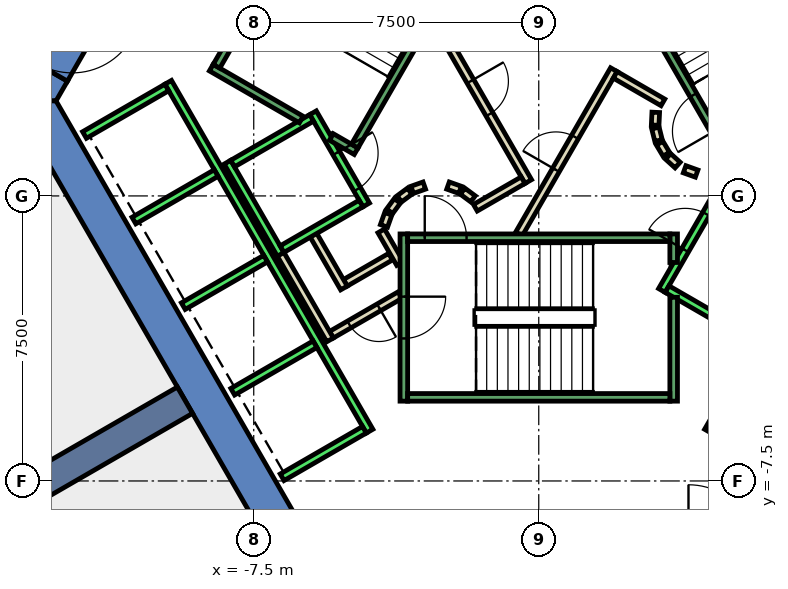
"""IFC4 building model, lengths in metres.
Left out: names, types, materials, properties, quantities, classifications, styles, units other than length and angle.
Written with IfcOpenShell. Run it as: python <this file> out.ifc"""

import sys

from ifc_helpers import new_model, si_unit, direction, frame, frame_2d, origin, place, context, subcontext, project, spatial, polyline, rectangle, outline, extrude, element, fill, save


model = new_model("IFC4")
c1 = context("Model", 3, precision=1e-05, world=origin(), true_north=direction((0.0, 1.0)))
c2 = subcontext(c1, "Body", "Model", "MODEL_VIEW")
j1 = project(units=[si_unit("LENGTHUNIT", "METRE"), si_unit("PLANEANGLEUNIT", "RADIAN")], contexts=[c1])
p1 = place(None, origin())
s1 = spatial("IfcSite", under=j1, at=p1, CompositionType="ELEMENT")
p2 = place(p1, origin())
s2 = spatial("IfcBuilding", under=s1, at=p2, CompositionType="ELEMENT")
p3 = place(p2, frame((0.0, 0.0, 47.6)))
s3 = spatial("IfcBuildingStorey", under=s2, at=p3, CompositionType="ELEMENT", Elevation=47.6)
p4 = place(p3, frame((0.0, 0.0, -0.4)))
e1 = element("IfcWall", 1, at=p4, inside=s3, PredefinedType="SHEAR", context=c2, shape_type="SweptSolid", body=[
    extrude(outline(polyline([(-12.402, 3.02), (-13.267, 3.52), (-13.856, 2.5), (-12.702, 2.5), (-12.402, 3.02)])), origin(), (0.0, 0.0, 1.0), 4.2),
])
p5 = place(p3, frame((0.0, 0.0, 3.6)))
e2 = element("IfcWall", 2, at=p5, inside=s3, PredefinedType="SHEAR", context=c2, shape_type="SweptSolid", body=[
    extrude(outline(polyline([(-13.267, 3.52), (-12.402, 3.02), (-11.402, 4.752), (-12.267, 5.252), (-13.267, 3.52)])), origin(), (0.0, 0.0, 1.0), 0.2),
])
p6 = place(p3, frame((0.0, 0.0, -0.4)))
e3 = element("IfcWall", 3, at=p6, inside=s3, PredefinedType="SHEAR", context=c2, shape_type="SweptSolid", body=[
    extrude(outline(polyline([(-13.856, 2.5), (-6.928, -9.5), (-6.351, -8.5), (-12.702, 2.5), (-13.856, 2.5)])), origin(), (0.0, 0.0, 1.0), 4.2),
])
p7 = place(p3, frame((-9.31, -5.375, -0.4), z_axis=(0.0, 0.0, 1.0), x_axis=(-0.866017533419, -0.500013631625, 0.0)))
e4 = element("IfcWall", 4, at=p7, inside=s3, PredefinedType="SHEAR", context=c2, shape_type="SweptSolid", body=[
    extrude(rectangle(XDim=9.0, YDim=0.8, at=frame_2d((4.5, 0.0))), origin(), (0.0, 0.0, 1.0), 4.2),
])
p8 = place(p3, frame((-3.9, -1.599, 0.0), z_axis=(0.0, 0.0, 1.0), x_axis=(-0.865969445389, -0.500096910261, 0.0)))
e5 = element("IfcWall", 5, at=p8, inside=s3, PredefinedType="PARTITIONING", context=c2, shape_type="SweptSolid", body=[
    extrude(rectangle(XDim=1.373, YDim=0.2, at=frame_2d((0.687, 0.0))), origin(), (0.0, 0.0, 1.0), 3.8),
])
p9 = place(p3, frame((-5.126, -2.422, 0.0), z_axis=(0.0, 0.0, 1.0), x_axis=(-0.500062241894, 0.865989465428, 0.0)))
e6 = element("IfcWall", 6, at=p9, inside=s3, PredefinedType="PARTITIONING", context=c2, shape_type="SweptSolid", body=[
    extrude(rectangle(XDim=1.7, YDim=0.2, at=frame_2d((0.85, 0.0))), origin(), (0.0, 0.0, 1.0), 3.8),
])
p10 = place(p3, frame((-3.65, -2.61, 0.0), z_axis=(0.0, 0.0, 1.0), x_axis=(-0.866072462134, -0.499918483688, 0.0)))
e7 = element("IfcWall", 7, at=p10, inside=s3, PredefinedType="PARTITIONING", context=c2, shape_type="SweptSolid", body=[
    extrude(rectangle(XDim=2.084, YDim=0.2, at=frame_2d((1.042, 0.0))), origin(), (0.0, 0.0, 1.0), 3.8),
])
p11 = place(p10, frame((0.642, 0.0, 0.0)))
e8 = element("IfcOpeningElement", 8, at=p11, cuts=e7, PredefinedType="OPENING", context=c2, shape_type="SweptSolid", body=[
    extrude(rectangle(XDim=0.9, YDim=2.1, at=frame_2d((0.45, 1.05))), frame((0.0, 0.11, 0.0), z_axis=(0.0, -1.0, 0.0), x_axis=(1.0, 0.0, 0.0)), (0.0, 0.0, 1.0), 0.22),
])
p12 = place(p3, frame((-5.492, -3.788, 0.0), z_axis=(0.0, 0.0, 1.0), x_axis=(-0.500008949224, 0.866020236886, 0.0)))
e9 = element("IfcWall", 9, at=p12, inside=s3, PredefinedType="PARTITIONING", context=c2, shape_type="SweptSolid", body=[
    extrude(rectangle(XDim=2.68, YDim=0.2, at=frame_2d((1.34, 0.0))), origin(), (0.0, 0.0, 1.0), 3.8),
])
p13 = place(p3, frame((-4.145, -0.92, 0.0), z_axis=(0.0, 0.0, 1.0), x_axis=(0.499743786207, -0.866173278362, 0.0)))
e10 = element("IfcWall", 10, at=p13, inside=s3, PredefinedType="PARTITIONING", context=c2, shape_type="SweptSolid", body=[
    extrude(rectangle(XDim=0.991, YDim=0.2, at=frame_2d((0.495, 0.0))), origin(), (0.0, 0.0, 1.0), 3.8),
])
p14 = place(p3, frame((-0.52, -1.0, 0.0), z_axis=(0.0, 0.0, 1.0), x_axis=(0.50011622646, 0.865958290007, 0.0)))
e11 = element("IfcWall", 11, at=p14, inside=s3, PredefinedType="PARTITIONING", context=c2, shape_type="SweptSolid", body=[
    extrude(rectangle(XDim=4.991, YDim=0.2, at=frame_2d((2.496, 0.0))), origin(), (0.0, 0.0, 1.0), 3.8),
])
p15 = place(p14, frame((1.945, 0.0, 0.0)))
e12 = element("IfcOpeningElement", 12, at=p15, cuts=e11, PredefinedType="OPENING", context=c2, shape_type="SweptSolid", body=[
    extrude(rectangle(XDim=1.0, YDim=2.1, at=frame_2d((0.5, 1.05))), frame((0.0, 0.11, 0.0), z_axis=(0.0, -1.0, 0.0), x_axis=(1.0, 0.0, 0.0)), (0.0, 0.0, 1.0), 0.22),
])
p16 = place(p3, frame((2.012, 3.186, 0.0), z_axis=(0.0, 0.0, 1.0), x_axis=(0.865891012941, -0.500232699559, 0.0)))
e13 = element("IfcWall", 13, at=p16, inside=s3, PredefinedType="PARTITIONING", context=c2, shape_type="SweptSolid", body=[
    extrude(rectangle(XDim=1.449, YDim=0.2, at=frame_2d((0.725, 0.0))), origin(), (0.0, 0.0, 1.0), 3.8),
])
p17 = place(p3, frame((3.079, 2.199, 0.0), z_axis=(0.0, 0.0, 1.0), x_axis=(-0.047771483479, -0.998858290933, 0.0)))
e14 = element("IfcWall", 14, at=p17, inside=s3, PredefinedType="PARTITIONING", context=c2, shape_type="SweptSolid", body=[
    extrude(rectangle(XDim=0.337, YDim=0.2, at=frame_2d((0.169, 0.0))), origin(), (0.0, 0.0, 1.0), 3.8),
])
p18 = place(p3, frame((3.07, 1.786, 0.0), z_axis=(0.0, 0.0, 1.0), x_axis=(0.242705583207, -0.970099994784, 0.0)))
e15 = element("IfcWall", 15, at=p18, inside=s3, PredefinedType="PARTITIONING", context=c2, shape_type="SweptSolid", body=[
    extrude(rectangle(XDim=0.338, YDim=0.2, at=frame_2d((0.169, 0.0))), origin(), (0.0, 0.0, 1.0), 3.8),
])
for number, where, z_axis, x_axis in (
    (16, (3.182, 1.388, 0.0), (0.0, 0.0, 1.0), (0.512, -0.859, 0.0)),
    (17, (3.404, 1.039, 0.0), (0.0, 0.0, 1.0), (0.74, -0.672, 0.0)),
):
    element("IfcWall", number, at=place(p3, frame(where, z_axis=z_axis, x_axis=x_axis)), inside=s3, PredefinedType="PARTITIONING", context=c2, shape_type="SweptSolid", body=[
        extrude(rectangle(XDim=0.338, YDim=0.2, at=frame_2d((0.169, 0.0))), origin(), (0.0, 0.0, 1.0), 3.8),
    ])
p19 = place(p3, frame((3.838, 0.702, 0.0), z_axis=(0.0, 0.0, 1.0), x_axis=(0.941035081519, -0.338308993895, 0.0)))
e18 = element("IfcWall", 18, at=p19, inside=s3, PredefinedType="PARTITIONING", context=c2, shape_type="SweptSolid", body=[
    extrude(rectangle(XDim=0.337, YDim=0.2, at=frame_2d((0.168, 0.0))), origin(), (0.0, 0.0, 1.0), 3.8),
])
p20 = place(p3, frame((-2.771, 4.7, 0.0), z_axis=(0.0, 0.0, 1.0), x_axis=(0.499969479948, -0.866043023828, 0.0)))
e19 = element("IfcWall", 19, at=p20, inside=s3, PredefinedType="PARTITIONING", context=c2, shape_type="SweptSolid", body=[
    extrude(rectangle(XDim=4.99, YDim=0.2, at=frame_2d((2.495, 0.0))), origin(), (0.0, 0.0, 1.0), 3.8),
])
p21 = place(p20, frame((1.945, 0.0, 0.0)))
e20 = element("IfcOpeningElement", 20, at=p21, cuts=e19, PredefinedType="OPENING", context=c2, shape_type="SweptSolid", body=[
    extrude(rectangle(XDim=1.0, YDim=2.1, at=frame_2d((0.5, 1.05))), frame((0.0, 0.11, 0.0), z_axis=(0.0, -1.0, 0.0), x_axis=(1.0, 0.0, 0.0)), (0.0, 0.0, 1.0), 0.22),
])
p22 = place(p3, frame((-0.412, 0.414, 0.0), z_axis=(0.0, 0.0, 1.0), x_axis=(-0.866017369001, -0.500013916395, 0.0)))
e21 = element("IfcWall", 21, at=p22, inside=s3, PredefinedType="PARTITIONING", context=c2, shape_type="SweptSolid", body=[
    extrude(rectangle(XDim=1.45, YDim=0.2, at=frame_2d((0.725, 0.0))), origin(), (0.0, 0.0, 1.0), 3.8),
])
p23 = place(p3, frame((-1.731, -0.077, 0.0), z_axis=(0.0, 0.0, 1.0), x_axis=(-0.804311165252, 0.594208338422, 0.0)))
e22 = element("IfcWall", 22, at=p23, inside=s3, PredefinedType="PARTITIONING", context=c2, shape_type="SweptSolid", body=[
    extrude(rectangle(XDim=0.338, YDim=0.2, at=frame_2d((0.169, 0.0))), origin(), (0.0, 0.0, 1.0), 3.8),
])
p24 = place(p3, frame((-2.07, 0.16, 0.0), z_axis=(0.0, 0.0, 1.0), x_axis=(-0.942199461132, 0.335052496547, 0.0)))
e23 = element("IfcWall", 23, at=p24, inside=s3, PredefinedType="PARTITIONING", context=c2, shape_type="SweptSolid", body=[
    extrude(rectangle(XDim=0.337, YDim=0.2, at=frame_2d((0.169, 0.0))), origin(), (0.0, 0.0, 1.0), 3.8),
])
p25 = place(p3, frame((-3.012, 0.273, 0.0), z_axis=(0.0, 0.0, 1.0), x_axis=(-0.942280615813, -0.334824194261, 0.0)))
e24 = element("IfcWall", 24, at=p25, inside=s3, PredefinedType="PARTITIONING", context=c2, shape_type="SweptSolid", body=[
    extrude(rectangle(XDim=0.338, YDim=0.2, at=frame_2d((0.169, 0.0))), origin(), (0.0, 0.0, 1.0), 3.8),
])
p26 = place(p3, frame((-3.397, 0.124, 0.0), z_axis=(0.0, 0.0, 1.0), x_axis=(-0.804311165252, -0.594208338422, 0.0)))
e25 = element("IfcWall", 25, at=p26, inside=s3, PredefinedType="PARTITIONING", context=c2, shape_type="SweptSolid", body=[
    extrude(rectangle(XDim=0.338, YDim=0.2, at=frame_2d((0.169, 0.0))), origin(), (0.0, 0.0, 1.0), 3.8),
])
p27 = place(p3, frame((-3.723, -0.131, 0.0), z_axis=(0.0, 0.0, 1.0), x_axis=(-0.594675113454, -0.803966112121, 0.0)))
e26 = element("IfcWall", 26, at=p27, inside=s3, PredefinedType="PARTITIONING", context=c2, shape_type="SweptSolid", body=[
    extrude(rectangle(XDim=0.338, YDim=0.2, at=frame_2d((0.169, 0.0))), origin(), (0.0, 0.0, 1.0), 3.8),
])
p28 = place(p3, frame((-3.96, -0.47, 0.0), z_axis=(0.0, 0.0, 1.0), x_axis=(-0.334824194261, -0.942280615813, 0.0)))
e27 = element("IfcWall", 27, at=p28, inside=s3, PredefinedType="PARTITIONING", context=c2, shape_type="SweptSolid", body=[
    extrude(rectangle(XDim=0.338, YDim=0.2, at=frame_2d((0.169, 0.0))), origin(), (0.0, 0.0, 1.0), 3.8),
])
p29 = place(p3, frame((-12.18, 5.202, 0.0), z_axis=(0.0, 0.0, 1.0), x_axis=(-0.50002537861, -0.866010750942, 0.0)))
e28 = element("IfcWall", 28, at=p29, inside=s3, PredefinedType="PARTITIONING", context=c2, shape_type="SweptSolid", body=[
    extrude(rectangle(XDim=2.0, YDim=0.2, at=frame_2d((1.0, 0.0))), origin(), (0.0, 0.0, 1.0), 2.4),
])
p30 = place(p29, frame((0.19, 0.0, 0.0)))
e29 = element("IfcOpeningElement", 29, at=p30, cuts=e28, PredefinedType="OPENING", context=c2, shape_type="SweptSolid", body=[
    extrude(rectangle(XDim=1.8, YDim=2.1, at=frame_2d((0.9, 1.05))), frame((0.0, 0.11, 0.0), z_axis=(0.0, -1.0, 0.0), x_axis=(1.0, 0.0, 0.0)), (0.0, 0.0, 1.0), 0.22),
])
p31 = place(p3, frame((-5.94, 2.188, 0.0), z_axis=(0.0, 0.0, 1.0), x_axis=(0.49994636267, -0.866056369097, 0.0)))
e30 = element("IfcWall", 30, at=p31, inside=s3, PredefinedType="STANDARD", context=c2, shape_type="SweptSolid", body=[
    extrude(rectangle(XDim=2.8, YDim=0.2, at=frame_2d((1.4, 0.0))), origin(), (0.0, 0.0, 1.0), 3.8),
])
p32 = place(p31, frame((1.225, 0.0, 0.0)))
e31 = element("IfcOpeningElement", 31, at=p32, cuts=e30, PredefinedType="OPENING", context=c2, shape_type="SweptSolid", body=[
    extrude(rectangle(XDim=1.1, YDim=2.1, at=frame_2d((0.55, 1.05))), frame((0.0, 0.11, 0.0), z_axis=(0.0, -1.0, 0.0), x_axis=(1.0, 0.0, 0.0)), (0.0, 0.0, 1.0), 0.22),
])
p33 = place(p3, frame((-8.192, 0.888, 0.0), z_axis=(0.0, 0.0, 1.0), x_axis=(0.49994636267, -0.866056369097, 0.0)))
e32 = element("IfcWall", 32, at=p33, inside=s3, PredefinedType="STANDARD", context=c2, shape_type="SweptSolid", body=[
    extrude(rectangle(XDim=2.8, YDim=0.2, at=frame_2d((1.4, 0.0))), origin(), (0.0, 0.0, 1.0), 3.8),
])
for number, where, z_axis, x_axis in (
    (33, (-5.977, 2.052, 0.0), (0.0, 0.0, 1.0), (-0.866, -0.5, 0.0)),
    (34, (-4.677, -0.2, 0.0), (0.0, 0.0, 1.0), (-0.866, -0.5, 0.0)),
):
    element("IfcWall", number, at=place(p3, frame(where, z_axis=z_axis, x_axis=x_axis)), inside=s3, PredefinedType="STANDARD", context=c2, shape_type="SweptSolid", body=[
        extrude(rectangle(XDim=2.399, YDim=0.2, at=frame_2d((1.2, 0.0))), origin(), (0.0, 0.0, 1.0), 3.8),
    ])
p34 = place(p3, frame((-9.751, 2.99, 0.0), z_axis=(0.0, 0.0, 1.0), x_axis=(0.50000090737, -0.866024879913, 0.0)))
e35 = element("IfcWall", 35, at=p34, inside=s3, PredefinedType="STANDARD", context=c2, shape_type="SweptSolid", body=[
    extrude(rectangle(XDim=10.6, YDim=0.2, at=frame_2d((5.3, 0.0))), origin(), (0.0, 0.0, 1.0), 3.8),
])
p35 = place(p3, frame((-9.788, 2.853, 0.0), z_axis=(0.0, 0.0, 1.0), x_axis=(-0.865998541277, -0.500046524342, 0.0)))
e36 = element("IfcWall", 36, at=p35, inside=s3, PredefinedType="STANDARD", context=c2, shape_type="SweptSolid", body=[
    extrude(rectangle(XDim=2.5, YDim=0.2, at=frame_2d((1.25, 0.0))), origin(), (0.0, 0.0, 1.0), 3.8),
])
for number, where, z_axis, x_axis in (
    (37, (-8.488, 0.602, 0.0), (0.0, 0.0, 1.0), (-0.866, -0.5, 0.0)),
    (38, (-7.188, -1.65, 0.0), (0.0, 0.0, 1.0), (-0.866, -0.5, 0.0)),
    (39, (-5.888, -3.902, 0.0), (0.0, 0.0, 1.0), (-0.866, -0.5, 0.0)),
    (40, (-4.588, -6.153, 0.0), (0.0, 0.0, 1.0), (-0.866, -0.5, 0.0)),
):
    element("IfcWall", number, at=place(p3, frame(where, z_axis=z_axis, x_axis=x_axis)), inside=s3, PredefinedType="STANDARD", context=c2, shape_type="SweptSolid", body=[
        extrude(rectangle(XDim=2.5, YDim=0.2, at=frame_2d((1.25, 0.0))), origin(), (0.0, 0.0, 1.0), 3.8),
    ])
p36 = place(p3, frame((3.24, -2.488, 0.0), z_axis=(0.0, 0.0, 1.0), x_axis=(0.49994636267, 0.866056369097, 0.0)))
e41 = element("IfcWall", 41, at=p36, inside=s3, PredefinedType="STANDARD", context=c2, shape_type="SweptSolid", body=[
    extrude(rectangle(XDim=2.8, YDim=0.2, at=frame_2d((1.4, 0.0))), origin(), (0.0, 0.0, 1.0), 3.8),
])
p37 = place(p36, frame((1.225, 0.0, 0.0)))
e42 = element("IfcOpeningElement", 42, at=p37, cuts=e41, PredefinedType="OPENING", context=c2, shape_type="SweptSolid", body=[
    extrude(rectangle(XDim=1.1, YDim=2.1, at=frame_2d((0.55, 1.05))), frame((0.0, 0.11, 0.0), z_axis=(0.0, -1.0, 0.0), x_axis=(1.0, 0.0, 0.0)), (0.0, 0.0, 1.0), 0.22),
])
p38 = place(p3, frame((3.377, -2.452, 0.0), z_axis=(0.0, 0.0, 1.0), x_axis=(0.865955154139, -0.50012165622, 0.0)))
e43 = element("IfcWall", 43, at=p38, inside=s3, PredefinedType="STANDARD", context=c2, shape_type="SweptSolid", body=[
    extrude(rectangle(XDim=2.4, YDim=0.2, at=frame_2d((1.2, 0.0))), origin(), (0.0, 0.0, 1.0), 3.8),
])
p39 = place(p3, frame((4.451, -6.19, 0.0), z_axis=(0.0, 0.0, 1.0), x_axis=(0.50000090737, 0.866024879913, 0.0)))
e44 = element("IfcWall", 44, at=p39, inside=s3, PredefinedType="STANDARD", context=c2, shape_type="SweptSolid", body=[
    extrude(rectangle(XDim=10.6, YDim=0.2, at=frame_2d((5.3, 0.0))), origin(), (0.0, 0.0, 1.0), 3.8),
])
p40 = place(p3, frame((-3.55, -1.0, 0.0), z_axis=(0.0, 0.0, 1.0), x_axis=(0.0, -1.0, 0.0)))
e45 = element("IfcWall", 45, at=p40, inside=s3, PredefinedType="STANDARD", context=c2, shape_type="SweptSolid", body=[
    extrude(rectangle(XDim=4.4, YDim=0.2, at=frame_2d((2.2, 0.0))), origin(), (0.0, 0.0, 1.0), 3.8),
])
p41 = place(p40, frame((1.65, 0.0, 0.0)))
e46 = element("IfcOpeningElement", 46, at=p41, cuts=e45, PredefinedType="OPENING", context=c2, shape_type="SweptSolid", body=[
    extrude(rectangle(XDim=1.1, YDim=2.2, at=frame_2d((0.55, 1.1))), frame((0.0, 0.11, 0.0), z_axis=(0.0, -1.0, 0.0), x_axis=(1.0, 0.0, 0.0)), (0.0, 0.0, 1.0), 0.22),
])
p42 = place(p3, frame((3.55, -2.667, 0.0), z_axis=(0.0, 0.0, 1.0), x_axis=(0.0, -1.0, 0.0)))
e47 = element("IfcWall", 47, at=p42, inside=s3, PredefinedType="STANDARD", context=c2, shape_type="SweptSolid", body=[
    extrude(rectangle(XDim=2.733, YDim=0.2, at=frame_2d((1.366, 0.0))), origin(), (0.0, 0.0, 1.0), 3.8),
])
p43 = place(p3, frame((3.55, -1.0, 0.0), z_axis=(0.0, 0.0, 1.0), x_axis=(0.0, -1.0, 0.0)))
e48 = element("IfcWall", 48, at=p43, inside=s3, PredefinedType="STANDARD", context=c2, shape_type="SweptSolid", body=[
    extrude(rectangle(XDim=0.751, YDim=0.2, at=frame_2d((0.375, 0.0))), origin(), (0.0, 0.0, 1.0), 3.8),
])
p44 = place(p3, frame((-3.45, -1.1, 0.0), z_axis=(0.0, 0.0, 1.0), x_axis=(1.0, 0.0, 0.0)))
e49 = element("IfcWall", 49, at=p44, inside=s3, PredefinedType="STANDARD", context=c2, shape_type="SweptSolid", body=[
    extrude(rectangle(XDim=6.9, YDim=0.2, at=frame_2d((3.45, 0.0))), origin(), (0.0, 0.0, 1.0), 3.8),
])
p45 = place(p44, frame((0.45, 0.0, 0.0)))
e50 = element("IfcOpeningElement", 50, at=p45, cuts=e49, PredefinedType="OPENING", context=c2, shape_type="SweptSolid", body=[
    extrude(rectangle(XDim=1.1, YDim=2.2, at=frame_2d((0.55, 1.1))), frame((0.0, 0.11, 0.0), z_axis=(0.0, -1.0, 0.0), x_axis=(1.0, 0.0, 0.0)), (0.0, 0.0, 1.0), 0.22),
])
p46 = place(p3, frame((-3.45, -5.3, 0.0), z_axis=(0.0, 0.0, 1.0), x_axis=(1.0, 0.0, 0.0)))
e51 = element("IfcWall", 51, at=p46, inside=s3, PredefinedType="STANDARD", context=c2, shape_type="SweptSolid", body=[
    extrude(rectangle(XDim=6.9, YDim=0.2, at=frame_2d((3.45, 0.0))), origin(), (0.0, 0.0, 1.0), 3.8),
])
p47 = place(p3, frame((4.843, 1.312, 0.0), z_axis=(0.0, 0.0, 1.0), x_axis=(-0.499963383562, 0.866046543262, 0.0)))
e52 = element("IfcWall", 52, at=p47, inside=s3, PredefinedType="STANDARD", context=c2, shape_type="SweptSolid", body=[
    extrude(rectangle(XDim=6.9, YDim=0.2, at=frame_2d((3.45, 0.0))), origin(), (0.0, 0.0, 1.0), 3.8),
])
p48 = place(p47, frame((0.45, 0.0, 0.0)))
e53 = element("IfcOpeningElement", 53, at=p48, cuts=e52, PredefinedType="OPENING", context=c2, shape_type="SweptSolid", body=[
    extrude(rectangle(XDim=1.1, YDim=2.2, at=frame_2d((0.55, 1.1))), frame((0.0, 0.11, 0.0), z_axis=(0.0, -1.0, 0.0), x_axis=(1.0, 0.0, 0.0)), (0.0, 0.0, 1.0), 0.22),
])
p49 = place(p3, frame((-6.25, 2.01, 0.0), z_axis=(0.0, 0.0, 1.0), x_axis=(-0.86611865017, 0.499838457731, 0.0)))
e54 = element("IfcWall", 54, at=p49, inside=s3, PredefinedType="STANDARD", context=c2, shape_type="SweptSolid", body=[
    extrude(rectangle(XDim=2.733, YDim=0.2, at=frame_2d((1.366, 0.0))), origin(), (0.0, 0.0, 1.0), 3.8),
])
p50 = place(p3, frame((-4.806, 1.176, 0.0), z_axis=(0.0, 0.0, 1.0), x_axis=(-0.866558586415, 0.499075361355, 0.0)))
e55 = element("IfcWall", 55, at=p50, inside=s3, PredefinedType="STANDARD", context=c2, shape_type="SweptSolid", body=[
    extrude(rectangle(XDim=0.751, YDim=0.2, at=frame_2d((0.376, 0.0))), origin(), (0.0, 0.0, 1.0), 3.8),
])
p51 = place(p3, frame((-1.393, 7.288, 0.0), z_axis=(0.0, 0.0, 1.0), x_axis=(-0.499963383562, -0.866046543262, 0.0)))
e56 = element("IfcWall", 56, at=p51, inside=s3, PredefinedType="STANDARD", context=c2, shape_type="SweptSolid", body=[
    extrude(rectangle(XDim=6.9, YDim=0.2, at=frame_2d((3.45, 0.0))), origin(), (0.0, 0.0, 1.0), 3.8),
])
p52 = place(p51, frame((0.45, 0.0, 0.0)))
e57 = element("IfcOpeningElement", 57, at=p52, cuts=e56, PredefinedType="OPENING", context=c2, shape_type="SweptSolid", body=[
    extrude(rectangle(XDim=1.1, YDim=2.2, at=frame_2d((0.55, 1.1))), frame((0.0, 0.11, 0.0), z_axis=(0.0, -1.0, 0.0), x_axis=(1.0, 0.0, 0.0)), (0.0, 0.0, 1.0), 0.22),
])
p53 = place(p3, frame((-5.03, 9.388, 0.0), z_axis=(0.0, 0.0, 1.0), x_axis=(-0.499978703459, -0.866037698999, 0.0)))
e58 = element("IfcWall", 58, at=p53, inside=s3, PredefinedType="STANDARD", context=c2, shape_type="SweptSolid", body=[
    extrude(rectangle(XDim=6.9, YDim=0.2, at=frame_2d((3.45, 0.0))), origin(), (0.0, 0.0, 1.0), 3.8),
])
p54 = place(p15, origin())
e59 = element("IfcDoor", 59, at=p54, inside=s3, OperationType="SINGLE_SWING_LEFT", PredefinedType="DOOR", context=c2, shape_type="SweptSolid", body=[
    extrude(rectangle(XDim=1.0, YDim=2.1, at=frame_2d((0.5, 1.05))), frame((0.0, 0.025, 0.0), z_axis=(0.0, -1.0, 0.0), x_axis=(1.0, 0.0, 0.0)), (0.0, 0.0, 1.0), 0.05),
])
fill(e12, e59)
p55 = place(p21, origin())
e60 = element("IfcDoor", 60, at=p55, inside=s3, OperationType="SINGLE_SWING_RIGHT", PredefinedType="DOOR", context=c2, shape_type="SweptSolid", body=[
    extrude(rectangle(XDim=1.0, YDim=2.1, at=frame_2d((0.5, 1.05))), frame((0.0, 0.025, 0.0), z_axis=(0.0, -1.0, 0.0), x_axis=(1.0, 0.0, 0.0)), (0.0, 0.0, 1.0), 0.05),
])
fill(e20, e60)
p56 = place(p11, origin())
e61 = element("IfcDoor", 61, at=p56, inside=s3, OperationType="SINGLE_SWING_LEFT", PredefinedType="DOOR", context=c2, shape_type="SweptSolid", body=[
    extrude(rectangle(XDim=0.9, YDim=2.1, at=frame_2d((0.45, 1.05))), frame((0.0, 0.025, 0.0), z_axis=(0.0, -1.0, 0.0), x_axis=(1.0, 0.0, 0.0)), (0.0, 0.0, 1.0), 0.05),
])
fill(e8, e61)
p57 = place(p30, origin())
e62 = element("IfcDoor", 62, at=p57, inside=s3, OperationType="DOUBLE_DOOR_SINGLE_SWING", PredefinedType="DOOR", context=c2, shape_type="SweptSolid", body=[
    extrude(rectangle(XDim=1.8, YDim=2.1, at=frame_2d((0.9, 1.05))), frame((0.0, 0.025, 0.0), z_axis=(0.0, -1.0, 0.0), x_axis=(1.0, 0.0, 0.0)), (0.0, 0.0, 1.0), 0.05),
])
fill(e29, e62)
p58 = place(p37, origin())
e63 = element("IfcDoor", 63, at=p58, inside=s3, OperationType="SLIDING_TO_LEFT", PredefinedType="DOOR", context=c2, shape_type="SweptSolid", body=[
    extrude(rectangle(XDim=1.1, YDim=2.1, at=frame_2d((0.55, 1.05))), frame((0.0, 0.025, 0.0), z_axis=(0.0, -1.0, 0.0), x_axis=(1.0, 0.0, 0.0)), (0.0, 0.0, 1.0), 0.05),
])
fill(e42, e63)
p59 = place(p32, origin())
e64 = element("IfcDoor", 64, at=p59, inside=s3, OperationType="SLIDING_TO_LEFT", PredefinedType="DOOR", context=c2, shape_type="SweptSolid", body=[
    extrude(rectangle(XDim=1.1, YDim=2.1, at=frame_2d((0.55, 1.05))), frame((0.0, 0.025, 0.0), z_axis=(0.0, -1.0, 0.0), x_axis=(1.0, 0.0, 0.0)), (0.0, 0.0, 1.0), 0.05),
])
fill(e31, e64)
p60 = place(p45, origin())
e65 = element("IfcDoor", 65, at=p60, inside=s3, OperationType="SINGLE_SWING_LEFT", PredefinedType="DOOR", context=c2, shape_type="SweptSolid", body=[
    extrude(rectangle(XDim=1.1, YDim=2.2, at=frame_2d((0.55, 1.1))), frame((0.0, 0.025, 0.0), z_axis=(0.0, -1.0, 0.0), x_axis=(1.0, 0.0, 0.0)), (0.0, 0.0, 1.0), 0.05),
])
fill(e50, e65)
p61 = place(p41, origin())
e66 = element("IfcDoor", 66, at=p61, inside=s3, OperationType="SINGLE_SWING_LEFT", PredefinedType="DOOR", context=c2, shape_type="SweptSolid", body=[
    extrude(rectangle(XDim=1.1, YDim=2.2, at=frame_2d((0.55, 1.1))), frame((0.0, 0.025, 0.0), z_axis=(0.0, -1.0, 0.0), x_axis=(1.0, 0.0, 0.0)), (0.0, 0.0, 1.0), 0.05),
])
fill(e46, e66)
p62 = place(p48, origin())
e67 = element("IfcDoor", 67, at=p62, inside=s3, OperationType="SINGLE_SWING_LEFT", PredefinedType="DOOR", context=c2, shape_type="SweptSolid", body=[
    extrude(rectangle(XDim=1.1, YDim=2.2, at=frame_2d((0.55, 1.1))), frame((0.0, 0.025, 0.0), z_axis=(0.0, -1.0, 0.0), x_axis=(1.0, 0.0, 0.0)), (0.0, 0.0, 1.0), 0.05),
])
fill(e53, e67)
save(model, sys.argv[1])
